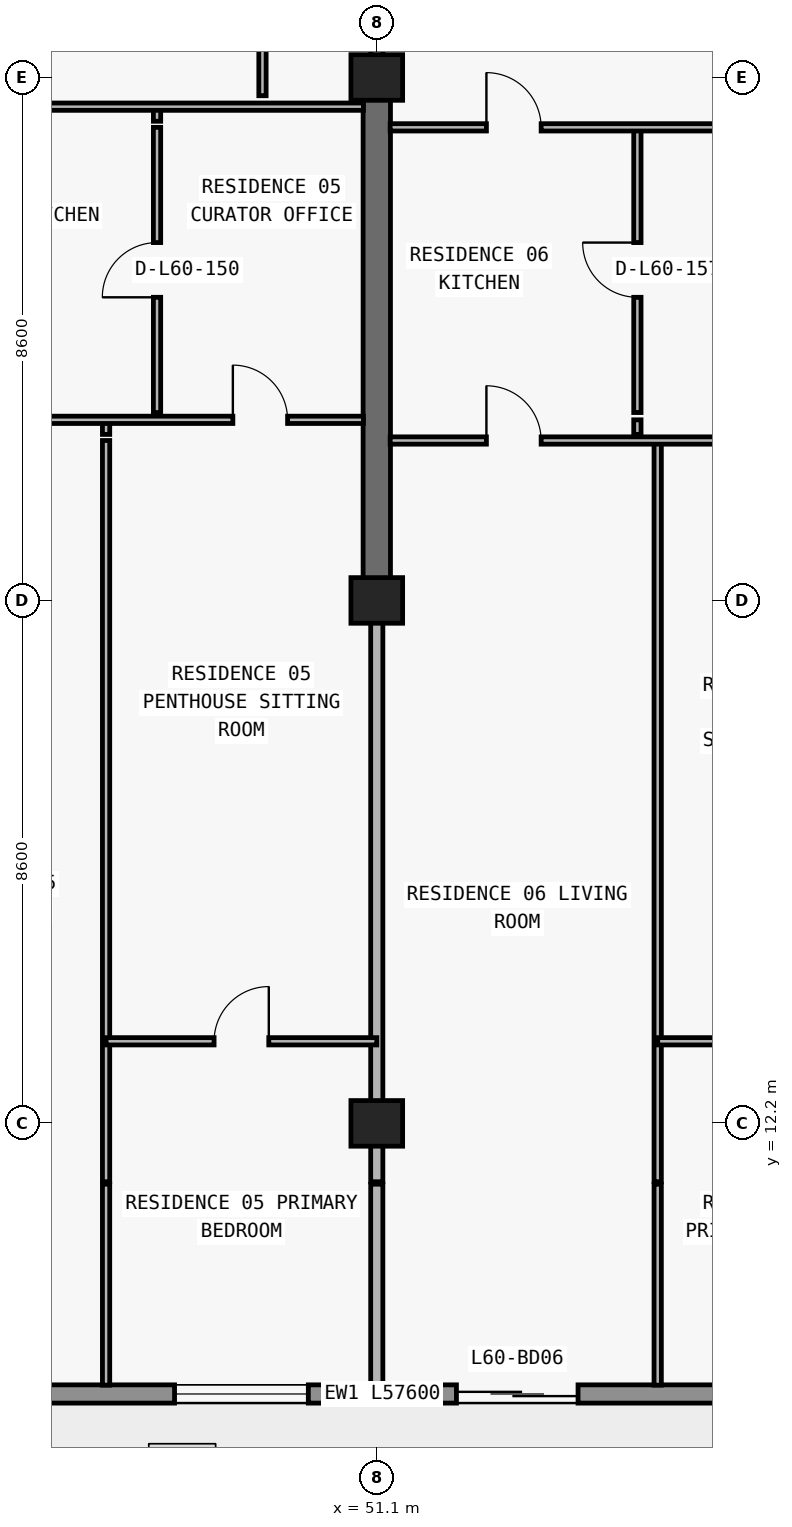
"""IFC4 building model, lengths in metres.
Left out: names, types, materials, properties, quantities, classifications, styles, units other than length and angle.
Written with IfcOpenShell. Run it as: python <this file> out.ifc"""

import sys

from ifc_helpers import new_model, si_unit, direction, frame, frame_2d, origin, origin_2d, place, context, subcontext, project, spatial, rectangle, extrude, element, fill, save


model = new_model("IFC4")
c1 = context("Model", 3, precision=1e-05, world=origin(), true_north=direction((0.0, 1.0)))
c2 = subcontext(c1, "Body", "Model", "MODEL_VIEW")
j1 = project(units=[si_unit("LENGTHUNIT", "METRE"), si_unit("PLANEANGLEUNIT", "RADIAN")], contexts=[c1])
p1 = place(None, origin())
s1 = spatial("IfcSite", under=j1, at=p1, CompositionType="ELEMENT")
p2 = place(p1, origin())
s2 = spatial("IfcBuilding", under=s1, at=p2, CompositionType="ELEMENT")
p3 = place(p2, frame((0.0, 0.0, 214.8)))
s3 = spatial("IfcBuildingStorey", under=s2, at=p3, CompositionType="ELEMENT", Elevation=214.8)
for number, where, z_axis, x_axis in (
    (1, (51.1, 12.2, 0.0), (0.0, 0.0, 1.0), (1.0, 0.0, 0.0)),
    (2, (51.1, 20.8, 0.0), (0.0, 0.0, 1.0), (1.0, 0.0, 0.0)),
    (3, (51.1, 29.4, 0.0), (0.0, 0.0, 1.0), (1.0, 0.0, 0.0)),
):
    element("IfcColumn", number, at=place(p3, frame(where, z_axis=z_axis, x_axis=x_axis)), inside=s3, PredefinedType="COLUMN", context=c2, shape_type="SweptSolid", body=[
        extrude(rectangle(XDim=0.85, YDim=0.75, at=origin_2d()), origin(), (0.0, 0.0, 1.0), 3.05),
    ])
p4 = place(p3, frame((51.1, 20.8, 0.0), z_axis=(0.0, 0.0, 1.0), x_axis=(0.0, 1.0, 0.0)))
e4 = element("IfcWall", 4, at=p4, inside=s3, PredefinedType="SHEAR", context=c2, shape_type="SweptSolid", body=[
    extrude(rectangle(XDim=8.6, YDim=0.45, at=frame_2d((4.3, 0.0))), origin(), (0.0, 0.0, 1.0), 3.05),
])
p5 = place(p3, frame((67.7, 7.75, 0.0), z_axis=(0.0, 0.0, 1.0), x_axis=(-1.0, 0.0, 0.0)))
e5 = element("IfcWall", 5, at=p5, inside=s3, PredefinedType="STANDARD", context=c2, shape_type="SweptSolid", body=[
    extrude(rectangle(XDim=57.6, YDim=0.3, at=frame_2d((28.8, 0.0))), origin(), (0.0, 0.0, 1.0), 3.05),
])
p6 = place(p5, frame((54.673, 0.0, 0.0)))
e6 = element("IfcOpeningElement", 6, at=p6, cuts=e5, PredefinedType="OPENING", context=c2, shape_type="SweptSolid", body=[
    extrude(rectangle(XDim=2.0, YDim=2.3, at=frame_2d((1.0, 1.15))), frame((0.0, 0.16, 0.0), z_axis=(0.0, -1.0, 0.0), x_axis=(1.0, 0.0, 0.0)), (0.0, 0.0, 1.0), 0.32),
])
p7 = place(p5, frame((50.473, 0.0, 0.85)))
e7 = element("IfcOpeningElement", 7, at=p7, cuts=e5, PredefinedType="OPENING", context=c2, shape_type="SweptSolid", body=[
    extrude(rectangle(XDim=2.2, YDim=1.55, at=frame_2d((1.1, 0.775))), frame((0.0, 0.16, 0.0), z_axis=(0.0, -1.0, 0.0), x_axis=(1.0, 0.0, 0.0)), (0.0, 0.0, 1.0), 0.32),
])
p8 = place(p5, frame((46.09, 0.0, 0.0)))
e8 = element("IfcOpeningElement", 8, at=p8, cuts=e5, PredefinedType="OPENING", context=c2, shape_type="SweptSolid", body=[
    extrude(rectangle(XDim=2.0, YDim=2.3, at=frame_2d((1.0, 1.15))), frame((0.0, 0.16, 0.0), z_axis=(0.0, -1.0, 0.0), x_axis=(1.0, 0.0, 0.0)), (0.0, 0.0, 1.0), 0.32),
])
p9 = place(p5, frame((41.99, 0.0, 0.85)))
e9 = element("IfcOpeningElement", 9, at=p9, cuts=e5, PredefinedType="OPENING", context=c2, shape_type="SweptSolid", body=[
    extrude(rectangle(XDim=1.8, YDim=1.55, at=frame_2d((0.9, 0.775))), frame((0.0, 0.16, 0.0), z_axis=(0.0, -1.0, 0.0), x_axis=(1.0, 0.0, 0.0)), (0.0, 0.0, 1.0), 0.32),
])
p10 = place(p5, frame((38.026, 0.0, 0.0)))
e10 = element("IfcOpeningElement", 10, at=p10, cuts=e5, PredefinedType="OPENING", context=c2, shape_type="SweptSolid", body=[
    extrude(rectangle(XDim=2.0, YDim=2.3, at=frame_2d((1.0, 1.15))), frame((0.0, 0.16, 0.0), z_axis=(0.0, -1.0, 0.0), x_axis=(1.0, 0.0, 0.0)), (0.0, 0.0, 1.0), 0.32),
])
p11 = place(p5, frame((33.726, 0.0, 0.85)))
e11 = element("IfcOpeningElement", 11, at=p11, cuts=e5, PredefinedType="OPENING", context=c2, shape_type="SweptSolid", body=[
    extrude(rectangle(XDim=2.2, YDim=1.55, at=frame_2d((1.1, 0.775))), frame((0.0, 0.16, 0.0), z_axis=(0.0, -1.0, 0.0), x_axis=(1.0, 0.0, 0.0)), (0.0, 0.0, 1.0), 0.32),
])
p12 = place(p5, frame((29.51, 0.0, 0.0)))
e12 = element("IfcOpeningElement", 12, at=p12, cuts=e5, PredefinedType="OPENING", context=c2, shape_type="SweptSolid", body=[
    extrude(rectangle(XDim=2.0, YDim=2.3, at=frame_2d((1.0, 1.15))), frame((0.0, 0.16, 0.0), z_axis=(0.0, -1.0, 0.0), x_axis=(1.0, 0.0, 0.0)), (0.0, 0.0, 1.0), 0.32),
])
p13 = place(p5, frame((25.81, 0.0, 0.85)))
e13 = element("IfcOpeningElement", 13, at=p13, cuts=e5, PredefinedType="OPENING", context=c2, shape_type="SweptSolid", body=[
    extrude(rectangle(XDim=1.8, YDim=1.55, at=frame_2d((0.9, 0.775))), frame((0.0, 0.16, 0.0), z_axis=(0.0, -1.0, 0.0), x_axis=(1.0, 0.0, 0.0)), (0.0, 0.0, 1.0), 0.32),
])
p14 = place(p5, frame((22.026, 0.0, 0.0)))
e14 = element("IfcOpeningElement", 14, at=p14, cuts=e5, PredefinedType="OPENING", context=c2, shape_type="SweptSolid", body=[
    extrude(rectangle(XDim=2.0, YDim=2.3, at=frame_2d((1.0, 1.15))), frame((0.0, 0.16, 0.0), z_axis=(0.0, -1.0, 0.0), x_axis=(1.0, 0.0, 0.0)), (0.0, 0.0, 1.0), 0.32),
])
p15 = place(p5, frame((17.726, 0.0, 0.85)))
e15 = element("IfcOpeningElement", 15, at=p15, cuts=e5, PredefinedType="OPENING", context=c2, shape_type="SweptSolid", body=[
    extrude(rectangle(XDim=2.2, YDim=1.55, at=frame_2d((1.1, 0.775))), frame((0.0, 0.16, 0.0), z_axis=(0.0, -1.0, 0.0), x_axis=(1.0, 0.0, 0.0)), (0.0, 0.0, 1.0), 0.32),
])
p16 = place(p5, frame((13.29, 0.0, 0.0)))
e16 = element("IfcOpeningElement", 16, at=p16, cuts=e5, PredefinedType="OPENING", context=c2, shape_type="SweptSolid", body=[
    extrude(rectangle(XDim=2.0, YDim=2.3, at=frame_2d((1.0, 1.15))), frame((0.0, 0.16, 0.0), z_axis=(0.0, -1.0, 0.0), x_axis=(1.0, 0.0, 0.0)), (0.0, 0.0, 1.0), 0.32),
])
p17 = place(p5, frame((9.19, 0.0, 0.85)))
e17 = element("IfcOpeningElement", 17, at=p17, cuts=e5, PredefinedType="OPENING", context=c2, shape_type="SweptSolid", body=[
    extrude(rectangle(XDim=1.8, YDim=1.55, at=frame_2d((0.9, 0.775))), frame((0.0, 0.16, 0.0), z_axis=(0.0, -1.0, 0.0), x_axis=(1.0, 0.0, 0.0)), (0.0, 0.0, 1.0), 0.32),
])
p18 = place(p5, frame((5.273, 0.0, 0.0)))
e18 = element("IfcOpeningElement", 18, at=p18, cuts=e5, PredefinedType="OPENING", context=c2, shape_type="SweptSolid", body=[
    extrude(rectangle(XDim=2.0, YDim=2.3, at=frame_2d((1.0, 1.15))), frame((0.0, 0.16, 0.0), z_axis=(0.0, -1.0, 0.0), x_axis=(1.0, 0.0, 0.0)), (0.0, 0.0, 1.0), 0.32),
])
p19 = place(p5, frame((1.073, 0.0, 0.85)))
e19 = element("IfcOpeningElement", 19, at=p19, cuts=e5, PredefinedType="OPENING", context=c2, shape_type="SweptSolid", body=[
    extrude(rectangle(XDim=2.2, YDim=1.55, at=frame_2d((1.1, 0.775))), frame((0.0, 0.16, 0.0), z_axis=(0.0, -1.0, 0.0), x_axis=(1.0, 0.0, 0.0)), (0.0, 0.0, 1.0), 0.32),
])
p20 = place(p3, frame((46.648, 7.895, 0.0), z_axis=(0.0, 0.0, 1.0), x_axis=(0.0, 1.0, 0.0)))
e20 = element("IfcWall", 20, at=p20, inside=s3, PredefinedType="PARTITIONING", context=c2, shape_type="SweptSolid", body=[
    extrude(rectangle(XDim=3.305, YDim=0.12, at=frame_2d((1.652, 0.0))), origin(), (0.0, 0.0, 1.0), 3.05),
])
p21 = place(p3, frame((46.648, 11.24, 0.0), z_axis=(0.0, 0.0, 1.0), x_axis=(0.0, 1.0, 0.0)))
e21 = element("IfcWall", 21, at=p21, inside=s3, PredefinedType="PARTITIONING", context=c2, shape_type="SweptSolid", body=[
    extrude(rectangle(XDim=12.19, YDim=0.12, at=frame_2d((6.095, 0.0))), origin(), (0.0, 0.0, 1.0), 3.05),
])
p22 = place(p3, frame((46.648, 23.53, 0.0), z_axis=(0.0, 0.0, 1.0), x_axis=(0.0, 1.0, 0.0)))
e22 = element("IfcWall", 22, at=p22, inside=s3, PredefinedType="PARTITIONING", context=c2, shape_type="SweptSolid", body=[
    extrude(rectangle(XDim=0.24, YDim=0.12, at=frame_2d((0.12, 0.0))), origin(), (0.0, 0.0, 1.0), 3.05),
])
p23 = place(p3, frame((47.486, 23.89, 0.0), z_axis=(0.0, 0.0, 1.0), x_axis=(0.0, 1.0, 0.0)))
e23 = element("IfcWall", 23, at=p23, inside=s3, PredefinedType="PARTITIONING", context=c2, shape_type="SweptSolid", body=[
    extrude(rectangle(XDim=4.69, YDim=0.12, at=frame_2d((2.345, 0.0))), origin(), (0.0, 0.0, 1.0), 3.05),
])
p24 = place(p23, frame((1.895, 0.0, 0.0)))
e24 = element("IfcOpeningElement", 24, at=p24, cuts=e23, PredefinedType="OPENING", context=c2, shape_type="SweptSolid", body=[
    extrude(rectangle(XDim=0.9, YDim=2.15, at=frame_2d((0.45, 1.075))), frame((0.0, 0.07, 0.0), z_axis=(0.0, -1.0, 0.0), x_axis=(1.0, 0.0, 0.0)), (0.0, 0.0, 1.0), 0.14),
])
p25 = place(p3, frame((47.486, 28.68, 0.0), z_axis=(0.0, 0.0, 1.0), x_axis=(0.0, 1.0, 0.0)))
e25 = element("IfcWall", 25, at=p25, inside=s3, PredefinedType="PARTITIONING", context=c2, shape_type="SweptSolid", body=[
    extrude(rectangle(XDim=0.24, YDim=0.12, at=frame_2d((0.12, 0.0))), origin(), (0.0, 0.0, 1.0), 3.05),
])
p26 = place(p3, frame((49.22, 29.1, 0.0), z_axis=(0.0, 0.0, 1.0), x_axis=(0.0, 1.0, 0.0)))
e26 = element("IfcWall", 26, at=p26, inside=s3, PredefinedType="PARTITIONING", context=c2, shape_type="SweptSolid", body=[
    extrude(rectangle(XDim=5.3, YDim=0.12, at=frame_2d((2.65, 0.0))), origin(), (0.0, 0.0, 1.0), 3.05),
])
p27 = place(p26, frame((2.225, 0.0, 0.0)))
e27 = element("IfcOpeningElement", 27, at=p27, cuts=e26, PredefinedType="OPENING", context=c2, shape_type="SweptSolid", body=[
    extrude(rectangle(XDim=0.85, YDim=2.1, at=frame_2d((0.425, 1.05))), frame((0.0, 0.07, 0.0), z_axis=(0.0, -1.0, 0.0), x_axis=(1.0, 0.0, 0.0)), (0.0, 0.0, 1.0), 0.14),
])
p28 = place(p3, frame((51.1, 7.895, 0.0), z_axis=(0.0, 0.0, 1.0), x_axis=(0.0, 1.0, 0.0)))
e28 = element("IfcWall", 28, at=p28, inside=s3, PredefinedType="PARTITIONING", context=c2, shape_type="SweptSolid", body=[
    extrude(rectangle(XDim=3.305, YDim=0.2, at=frame_2d((1.652, 0.0))), origin(), (0.0, 0.0, 1.0), 3.05),
])
p29 = place(p3, frame((51.1, 11.24, 0.0), z_axis=(0.0, 0.0, 1.0), x_axis=(0.0, 1.0, 0.0)))
e29 = element("IfcWall", 29, at=p29, inside=s3, PredefinedType="PARTITIONING", context=c2, shape_type="SweptSolid", body=[
    extrude(rectangle(XDim=9.555, YDim=0.2, at=frame_2d((4.777, 0.0))), origin(), (0.0, 0.0, 1.0), 2.263),
])
p30 = place(p3, frame((51.1, 29.405, 0.0), z_axis=(0.0, 0.0, 1.0), x_axis=(0.0, 1.0, 0.0)))
e30 = element("IfcWall", 30, at=p30, inside=s3, PredefinedType="PARTITIONING", context=c2, shape_type="SweptSolid", body=[
    extrude(rectangle(XDim=4.995, YDim=0.2, at=frame_2d((2.498, 0.0))), origin(), (0.0, 0.0, 1.0), 2.335),
])
p31 = place(p3, frame((55.386, 23.53, 0.0), z_axis=(0.0, 0.0, 1.0), x_axis=(0.0, 1.0, 0.0)))
e31 = element("IfcWall", 31, at=p31, inside=s3, PredefinedType="PARTITIONING", context=c2, shape_type="SweptSolid", body=[
    extrude(rectangle(XDim=0.24, YDim=0.12, at=frame_2d((0.12, 0.0))), origin(), (0.0, 0.0, 1.0), 3.05),
])
p32 = place(p3, frame((55.386, 23.89, 0.0), z_axis=(0.0, 0.0, 1.0), x_axis=(0.0, 1.0, 0.0)))
e32 = element("IfcWall", 32, at=p32, inside=s3, PredefinedType="PARTITIONING", context=c2, shape_type="SweptSolid", body=[
    extrude(rectangle(XDim=4.69, YDim=0.12, at=frame_2d((2.345, 0.0))), origin(), (0.0, 0.0, 1.0), 3.05),
])
p33 = place(p32, frame((1.895, 0.0, 0.0)))
e33 = element("IfcOpeningElement", 33, at=p33, cuts=e32, PredefinedType="OPENING", context=c2, shape_type="SweptSolid", body=[
    extrude(rectangle(XDim=0.9, YDim=2.15, at=frame_2d((0.45, 1.075))), frame((0.0, 0.07, 0.0), z_axis=(0.0, -1.0, 0.0), x_axis=(1.0, 0.0, 0.0)), (0.0, 0.0, 1.0), 0.14),
])
p34 = place(p3, frame((55.72, 7.895, 0.0), z_axis=(0.0, 0.0, 1.0), x_axis=(0.0, 1.0, 0.0)))
e34 = element("IfcWall", 34, at=p34, inside=s3, PredefinedType="PARTITIONING", context=c2, shape_type="SweptSolid", body=[
    extrude(rectangle(XDim=3.305, YDim=0.12, at=frame_2d((1.652, 0.0))), origin(), (0.0, 0.0, 1.0), 3.05),
])
p35 = place(p3, frame((55.72, 11.24, 0.0), z_axis=(0.0, 0.0, 1.0), x_axis=(0.0, 1.0, 0.0)))
e35 = element("IfcWall", 35, at=p35, inside=s3, PredefinedType="PARTITIONING", context=c2, shape_type="SweptSolid", body=[
    extrude(rectangle(XDim=12.19, YDim=0.12, at=frame_2d((6.095, 0.0))), origin(), (0.0, 0.0, 1.0), 3.05),
])
p36 = place(p3, frame((46.648, 13.55, 0.0), z_axis=(0.0, 0.0, 1.0), x_axis=(1.0, 0.0, 0.0)))
e36 = element("IfcWall", 36, at=p36, inside=s3, PredefinedType="PARTITIONING", context=c2, shape_type="SweptSolid", body=[
    extrude(rectangle(XDim=4.452, YDim=0.12, at=frame_2d((2.226, 0.0))), origin(), (0.0, 0.0, 1.0), 3.05),
])
p37 = place(p36, frame((1.776, 0.0, 0.0)))
e37 = element("IfcOpeningElement", 37, at=p37, cuts=e36, PredefinedType="OPENING", context=c2, shape_type="SweptSolid", body=[
    extrude(rectangle(XDim=0.9, YDim=2.15, at=frame_2d((0.45, 1.075))), frame((0.0, 0.07, 0.0), z_axis=(0.0, -1.0, 0.0), x_axis=(1.0, 0.0, 0.0)), (0.0, 0.0, 1.0), 0.14),
])
p38 = place(p3, frame((55.72, 13.55, 0.0), z_axis=(0.0, 0.0, 1.0), x_axis=(1.0, 0.0, 0.0)))
e38 = element("IfcWall", 38, at=p38, inside=s3, PredefinedType="PARTITIONING", context=c2, shape_type="SweptSolid", body=[
    extrude(rectangle(XDim=3.78, YDim=0.12, at=frame_2d((1.89, 0.0))), origin(), (0.0, 0.0, 1.0), 3.05),
])
p39 = place(p38, frame((1.44, 0.0, 0.0)))
e39 = element("IfcOpeningElement", 39, at=p39, cuts=e38, PredefinedType="OPENING", context=c2, shape_type="SweptSolid", body=[
    extrude(rectangle(XDim=0.9, YDim=2.15, at=frame_2d((0.45, 1.075))), frame((0.0, 0.07, 0.0), z_axis=(0.0, -1.0, 0.0), x_axis=(1.0, 0.0, 0.0)), (0.0, 0.0, 1.0), 0.14),
])
p40 = place(p3, frame((51.32, 23.43, 0.0), z_axis=(0.0, 0.0, 1.0), x_axis=(1.0, 0.0, 0.0)))
e40 = element("IfcWall", 40, at=p40, inside=s3, PredefinedType="PARTITIONING", context=c2, shape_type="SweptSolid", body=[
    extrude(rectangle(XDim=8.18, YDim=0.12, at=frame_2d((4.09, 0.0))), origin(), (0.0, 0.0, 1.0), 3.05),
])
p41 = place(p40, frame((1.583, 0.0, 0.0)))
e41 = element("IfcOpeningElement", 41, at=p41, cuts=e40, PredefinedType="OPENING", context=c2, shape_type="SweptSolid", body=[
    extrude(rectangle(XDim=0.9, YDim=2.15, at=frame_2d((0.45, 1.075))), frame((0.0, 0.07, 0.0), z_axis=(0.0, -1.0, 0.0), x_axis=(1.0, 0.0, 0.0)), (0.0, 0.0, 1.0), 0.14),
])
p42 = place(p40, frame((5.84, 0.0, 0.0)))
e42 = element("IfcOpeningElement", 42, at=p42, cuts=e40, PredefinedType="OPENING", context=c2, shape_type="SweptSolid", body=[
    extrude(rectangle(XDim=0.9, YDim=2.15, at=frame_2d((0.45, 1.075))), frame((0.0, 0.07, 0.0), z_axis=(0.0, -1.0, 0.0), x_axis=(1.0, 0.0, 0.0)), (0.0, 0.0, 1.0), 0.14),
])
p43 = place(p3, frame((42.7, 23.77, 0.0), z_axis=(0.0, 0.0, 1.0), x_axis=(1.0, 0.0, 0.0)))
e43 = element("IfcWall", 43, at=p43, inside=s3, PredefinedType="PARTITIONING", context=c2, shape_type="SweptSolid", body=[
    extrude(rectangle(XDim=8.18, YDim=0.12, at=frame_2d((4.09, 0.0))), origin(), (0.0, 0.0, 1.0), 3.05),
])
p44 = place(p43, frame((1.524, 0.0, 0.0)))
e44 = element("IfcOpeningElement", 44, at=p44, cuts=e43, PredefinedType="OPENING", context=c2, shape_type="SweptSolid", body=[
    extrude(rectangle(XDim=0.9, YDim=2.15, at=frame_2d((0.45, 1.075))), frame((0.0, 0.07, 0.0), z_axis=(0.0, -1.0, 0.0), x_axis=(1.0, 0.0, 0.0)), (0.0, 0.0, 1.0), 0.14),
])
p45 = place(p43, frame((6.033, 0.0, 0.0)))
e45 = element("IfcOpeningElement", 45, at=p45, cuts=e43, PredefinedType="OPENING", context=c2, shape_type="SweptSolid", body=[
    extrude(rectangle(XDim=0.9, YDim=2.15, at=frame_2d((0.45, 1.075))), frame((0.0, 0.07, 0.0), z_axis=(0.0, -1.0, 0.0), x_axis=(1.0, 0.0, 0.0)), (0.0, 0.0, 1.0), 0.14),
])
p46 = place(p3, frame((51.32, 28.58, 0.0), z_axis=(0.0, 0.0, 1.0), x_axis=(1.0, 0.0, 0.0)))
e46 = element("IfcWall", 46, at=p46, inside=s3, PredefinedType="PARTITIONING", context=c2, shape_type="SweptSolid", body=[
    extrude(rectangle(XDim=8.18, YDim=0.12, at=frame_2d((4.09, 0.0))), origin(), (0.0, 0.0, 1.0), 3.05),
])
p47 = place(p46, frame((1.583, 0.0, 0.0)))
e47 = element("IfcOpeningElement", 47, at=p47, cuts=e46, PredefinedType="OPENING", context=c2, shape_type="SweptSolid", body=[
    extrude(rectangle(XDim=0.9, YDim=2.15, at=frame_2d((0.45, 1.075))), frame((0.0, 0.07, 0.0), z_axis=(0.0, -1.0, 0.0), x_axis=(1.0, 0.0, 0.0)), (0.0, 0.0, 1.0), 0.14),
])
p48 = place(p3, frame((42.7, 28.92, 0.0), z_axis=(0.0, 0.0, 1.0), x_axis=(1.0, 0.0, 0.0)))
e48 = element("IfcWall", 48, at=p48, inside=s3, PredefinedType="PARTITIONING", context=c2, shape_type="SweptSolid", body=[
    extrude(rectangle(XDim=8.18, YDim=0.12, at=frame_2d((4.09, 0.0))), origin(), (0.0, 0.0, 1.0), 3.05),
])
p49 = place(p48, frame((1.943, 0.0, 0.0)))
e49 = element("IfcOpeningElement", 49, at=p49, cuts=e48, PredefinedType="OPENING", context=c2, shape_type="SweptSolid", body=[
    extrude(rectangle(XDim=0.9, YDim=2.15, at=frame_2d((0.45, 1.075))), frame((0.0, 0.07, 0.0), z_axis=(0.0, -1.0, 0.0), x_axis=(1.0, 0.0, 0.0)), (0.0, 0.0, 1.0), 0.14),
])
p50 = place(p15, origin())
e50 = element("IfcWindow", 50, at=p50, inside=s3, PartitioningType="SINGLE_PANEL", PredefinedType="WINDOW", context=c2, shape_type="SweptSolid", body=[
    extrude(rectangle(XDim=2.2, YDim=1.55, at=frame_2d((1.1, 0.775))), frame((0.0, 0.03, 0.0), z_axis=(0.0, -1.0, 0.0), x_axis=(1.0, 0.0, 0.0)), (0.0, 0.0, 1.0), 0.06),
])
fill(e15, e50)
p51 = place(p16, origin())
e51 = element("IfcDoor", 51, at=p51, inside=s3, OperationType="DOUBLE_DOOR_SLIDING", PredefinedType="DOOR", context=c2, shape_type="SweptSolid", body=[
    extrude(rectangle(XDim=2.0, YDim=2.3, at=frame_2d((1.0, 1.15))), frame((0.0, 0.025, 0.0), z_axis=(0.0, -1.0, 0.0), x_axis=(1.0, 0.0, 0.0)), (0.0, 0.0, 1.0), 0.05),
])
fill(e16, e51)
p52 = place(p24, origin())
e52 = element("IfcDoor", 52, at=p52, inside=s3, OperationType="SINGLE_SWING_LEFT", PredefinedType="DOOR", context=c2, shape_type="SweptSolid", body=[
    extrude(rectangle(XDim=0.9, YDim=2.15, at=frame_2d((0.45, 1.075))), frame((0.0, 0.025, 0.0), z_axis=(0.0, -1.0, 0.0), x_axis=(1.0, 0.0, 0.0)), (0.0, 0.0, 1.0), 0.05),
])
fill(e24, e52)
p53 = place(p45, origin())
e53 = element("IfcDoor", 53, at=p53, inside=s3, OperationType="SINGLE_SWING_LEFT", PredefinedType="DOOR", context=c2, shape_type="SweptSolid", body=[
    extrude(rectangle(XDim=0.9, YDim=2.15, at=frame_2d((0.45, 1.075))), frame((0.0, 0.025, 0.0), z_axis=(0.0, -1.0, 0.0), x_axis=(1.0, 0.0, 0.0)), (0.0, 0.0, 1.0), 0.05),
])
fill(e45, e53)
p54 = place(p37, origin())
e54 = element("IfcDoor", 54, at=p54, inside=s3, OperationType="SINGLE_SWING_RIGHT", PredefinedType="DOOR", context=c2, shape_type="SweptSolid", body=[
    extrude(rectangle(XDim=0.9, YDim=2.15, at=frame_2d((0.45, 1.075))), frame((0.0, 0.025, 0.0), z_axis=(0.0, -1.0, 0.0), x_axis=(1.0, 0.0, 0.0)), (0.0, 0.0, 1.0), 0.05),
])
fill(e37, e54)
p55 = place(p47, origin())
e55 = element("IfcDoor", 55, at=p55, inside=s3, OperationType="SINGLE_SWING_LEFT", PredefinedType="DOOR", context=c2, shape_type="SweptSolid", body=[
    extrude(rectangle(XDim=0.9, YDim=2.15, at=frame_2d((0.45, 1.075))), frame((0.0, 0.025, 0.0), z_axis=(0.0, -1.0, 0.0), x_axis=(1.0, 0.0, 0.0)), (0.0, 0.0, 1.0), 0.05),
])
fill(e47, e55)
p56 = place(p33, origin())
e56 = element("IfcDoor", 56, at=p56, inside=s3, OperationType="SINGLE_SWING_RIGHT", PredefinedType="DOOR", context=c2, shape_type="SweptSolid", body=[
    extrude(rectangle(XDim=0.9, YDim=2.15, at=frame_2d((0.45, 1.075))), frame((0.0, 0.025, 0.0), z_axis=(0.0, -1.0, 0.0), x_axis=(1.0, 0.0, 0.0)), (0.0, 0.0, 1.0), 0.05),
])
fill(e33, e56)
p57 = place(p41, origin())
e57 = element("IfcDoor", 57, at=p57, inside=s3, OperationType="SINGLE_SWING_LEFT", PredefinedType="DOOR", context=c2, shape_type="SweptSolid", body=[
    extrude(rectangle(XDim=0.9, YDim=2.15, at=frame_2d((0.45, 1.075))), frame((0.0, 0.025, 0.0), z_axis=(0.0, -1.0, 0.0), x_axis=(1.0, 0.0, 0.0)), (0.0, 0.0, 1.0), 0.05),
])
fill(e41, e57)
save(model, sys.argv[1])
